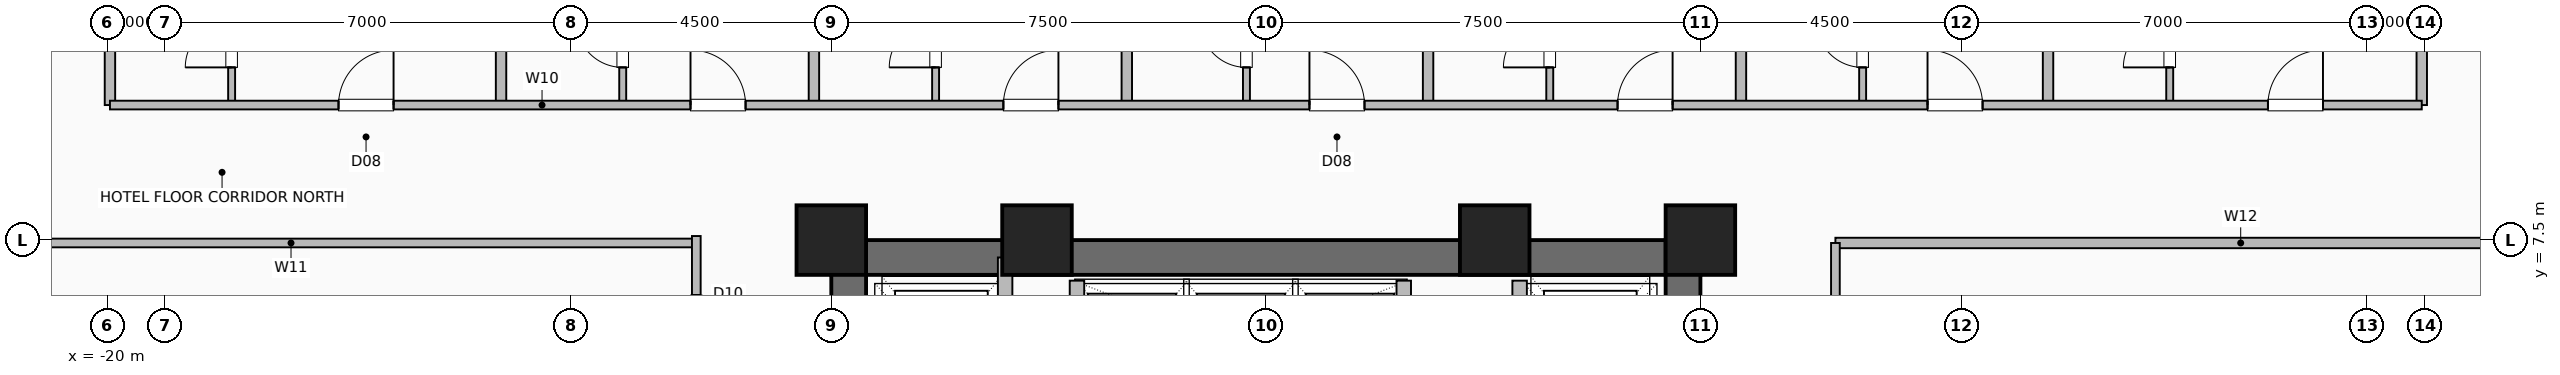
"""IFC4 building model, lengths in metres.
Left out: names, types, materials, properties, quantities, classifications, styles, units other than length and angle.
Written with IfcOpenShell. Run it as: python <this file> out.ifc"""

import sys

from ifc_helpers import new_model, si_unit, direction, frame, frame_2d, origin, origin_2d, place, context, subcontext, project, spatial, rectangle, hollow_rectangle, extrude, element, fill, save


model = new_model("IFC4")
c1 = context("Model", 3, precision=1e-05, world=origin(), true_north=direction((0.0, 1.0)))
c2 = subcontext(c1, "Body", "Model", "MODEL_VIEW")
j1 = project(units=[si_unit("LENGTHUNIT", "METRE"), si_unit("PLANEANGLEUNIT", "RADIAN")], contexts=[c1])
p1 = place(None, origin())
s1 = spatial("IfcSite", under=j1, at=p1, CompositionType="ELEMENT")
p2 = place(p1, origin())
s2 = spatial("IfcBuilding", under=s1, at=p2, CompositionType="ELEMENT")
p3 = place(p2, frame((0.0, 0.0, 72.5)))
s3 = spatial("IfcBuildingStorey", under=s2, at=p3, CompositionType="ELEMENT", Elevation=72.5)
for number, where, z_axis, x_axis in (
    (1, (7.5, 7.5, 0.0), (0.0, 0.0, 1.0), (1.0, 0.0, 0.0)),
    (2, (3.95, 7.5, 0.0), (0.0, 0.0, 1.0), (1.0, 0.0, 0.0)),
    (3, (-3.95, 7.5, 0.0), (0.0, 0.0, 1.0), (1.0, 0.0, 0.0)),
    (4, (-7.5, 7.5, 0.0), (0.0, 0.0, 1.0), (1.0, 0.0, 0.0)),
):
    element("IfcColumn", number, at=place(p3, frame(where, z_axis=z_axis, x_axis=x_axis)), inside=s3, PredefinedType="COLUMN", context=c2, shape_type="SweptSolid", body=[
        extrude(hollow_rectangle(XDim=1.2, YDim=1.2, WallThickness=0.055, at=origin_2d()), origin(), (0.0, 0.0, 1.0), 3.5),
    ])
p4 = place(p3, frame((-7.5, 7.2, 0.0), z_axis=(0.0, 0.0, 1.0), x_axis=(1.0, 0.0, 0.0)))
e5 = element("IfcWall", 5, at=p4, inside=s3, PredefinedType="SHEAR", context=c2, shape_type="SweptSolid", body=[
    extrude(rectangle(XDim=15.0, YDim=0.6, at=frame_2d((7.5, 0.0))), origin(), (0.0, 0.0, 1.0), 3.25),
])
p5 = place(p3, frame((-7.2, -7.5, 0.0), z_axis=(0.0, 0.0, 1.0), x_axis=(0.0, 1.0, 0.0)))
e6 = element("IfcWall", 6, at=p5, inside=s3, PredefinedType="SHEAR", context=c2, shape_type="SweptSolid", body=[
    extrude(rectangle(XDim=15.0, YDim=0.6, at=frame_2d((7.5, 0.0))), origin(), (0.0, 0.0, 1.0), 3.25),
])
p6 = place(p5, frame((9.5, 0.0, 0.0)))
e7 = element("IfcOpeningElement", 7, at=p6, cuts=e6, PredefinedType="OPENING", context=c2, shape_type="SweptSolid", body=[
    extrude(rectangle(XDim=1.0, YDim=2.08, at=frame_2d((0.5, 1.04))), frame((0.0, 0.31, 0.0), z_axis=(0.0, -1.0, 0.0), x_axis=(1.0, 0.0, 0.0)), (0.0, 0.0, 1.0), 0.62),
])
p7 = place(p3, frame((7.2, -7.5, 0.0), z_axis=(0.0, 0.0, 1.0), x_axis=(0.0, 1.0, 0.0)))
e8 = element("IfcWall", 8, at=p7, inside=s3, PredefinedType="SHEAR", context=c2, shape_type="SweptSolid", body=[
    extrude(rectangle(XDim=15.0, YDim=0.6, at=frame_2d((7.5, 0.0))), origin(), (0.0, 0.0, 1.0), 3.25),
])
for number, where, z_axis, x_axis in (
    (9, (-3.26, 4.58, 0.0), (0.0, 0.0, 1.0), (0.0, 1.0, 0.0)),
    (10, (2.38, 4.58, 0.0), (0.0, 0.0, 1.0), (0.0, 1.0, 0.0)),
):
    element("IfcWall", number, at=place(p3, frame(where, z_axis=z_axis, x_axis=x_axis)), inside=s3, PredefinedType="SHEAR", context=c2, shape_type="SweptSolid", body=[
        extrude(rectangle(XDim=2.22, YDim=0.25, at=frame_2d((1.11, 0.0))), origin(), (0.0, 0.0, 1.0), 3.25),
    ])
p8 = place(p3, frame((-4.5, 4.35, 0.0), z_axis=(0.0, 0.0, 1.0), x_axis=(0.0, 1.0, 0.0)))
e11 = element("IfcWall", 11, at=p8, inside=s3, PredefinedType="SHEAR", context=c2, shape_type="SweptSolid", body=[
    extrude(rectangle(XDim=2.85, YDim=0.25, at=frame_2d((1.425, 0.0))), origin(), (0.0, 0.0, 1.0), 3.25),
])
p9 = place(p3, frame((4.38, 4.3, 0.0), z_axis=(0.0, 0.0, 1.0), x_axis=(0.0, 1.0, 0.0)))
e12 = element("IfcWall", 12, at=p9, inside=s3, PredefinedType="SHEAR", context=c2, shape_type="SweptSolid", body=[
    extrude(rectangle(XDim=2.5, YDim=0.25, at=frame_2d((1.25, 0.0))), origin(), (0.0, 0.0, 1.0), 3.25),
])
p10 = place(p9, frame((0.8, 0.0, 0.0)))
e13 = element("IfcOpeningElement", 13, at=p10, cuts=e12, PredefinedType="OPENING", context=c2, shape_type="SweptSolid", body=[
    extrude(rectangle(XDim=1.2, YDim=2.2, at=frame_2d((0.6, 1.1))), frame((0.0, 0.135, 0.0), z_axis=(0.0, -1.0, 0.0), x_axis=(1.0, 0.0, 0.0)), (0.0, 0.0, 1.0), 0.27),
])
p11 = place(p3, frame((-17.85, 9.83, 0.0), z_axis=(0.0, 0.0, 1.0), x_axis=(0.0, 1.0, 0.0)))
e14 = element("IfcWall", 14, at=p11, inside=s3, PredefinedType="PLUMBINGWALL", context=c2, shape_type="SweptSolid", body=[
    extrude(rectangle(XDim=2.25, YDim=0.12, at=frame_2d((1.125, 0.0))), origin(), (0.0, 0.0, 1.0), 3.25),
])
p12 = place(p11, frame((0.65, 0.0, 0.0)))
e15 = element("IfcOpeningElement", 15, at=p12, cuts=e14, PredefinedType="OPENING", context=c2, shape_type="SweptSolid", body=[
    extrude(rectangle(XDim=0.8, YDim=2.05, at=frame_2d((0.4, 1.025))), frame((0.0, 0.07, 0.0), z_axis=(0.0, -1.0, 0.0), x_axis=(1.0, 0.0, 0.0)), (0.0, 0.0, 1.0), 0.14),
])
p13 = place(p3, frame((-11.1, 9.83, 0.0), z_axis=(0.0, 0.0, 1.0), x_axis=(0.0, 1.0, 0.0)))
e16 = element("IfcWall", 16, at=p13, inside=s3, PredefinedType="PLUMBINGWALL", context=c2, shape_type="SweptSolid", body=[
    extrude(rectangle(XDim=2.25, YDim=0.12, at=frame_2d((1.125, 0.0))), origin(), (0.0, 0.0, 1.0), 3.25),
])
p14 = place(p13, frame((0.65, 0.0, 0.0)))
e17 = element("IfcOpeningElement", 17, at=p14, cuts=e16, PredefinedType="OPENING", context=c2, shape_type="SweptSolid", body=[
    extrude(rectangle(XDim=0.8, YDim=2.05, at=frame_2d((0.4, 1.025))), frame((0.0, 0.07, 0.0), z_axis=(0.0, -1.0, 0.0), x_axis=(1.0, 0.0, 0.0)), (0.0, 0.0, 1.0), 0.14),
])
p15 = place(p3, frame((-5.7, 9.83, 0.0), z_axis=(0.0, 0.0, 1.0), x_axis=(0.0, 1.0, 0.0)))
e18 = element("IfcWall", 18, at=p15, inside=s3, PredefinedType="PLUMBINGWALL", context=c2, shape_type="SweptSolid", body=[
    extrude(rectangle(XDim=2.25, YDim=0.12, at=frame_2d((1.125, 0.0))), origin(), (0.0, 0.0, 1.0), 3.25),
])
p16 = place(p15, frame((0.65, 0.0, 0.0)))
e19 = element("IfcOpeningElement", 19, at=p16, cuts=e18, PredefinedType="OPENING", context=c2, shape_type="SweptSolid", body=[
    extrude(rectangle(XDim=0.8, YDim=2.05, at=frame_2d((0.4, 1.025))), frame((0.0, 0.07, 0.0), z_axis=(0.0, -1.0, 0.0), x_axis=(1.0, 0.0, 0.0)), (0.0, 0.0, 1.0), 0.14),
])
p17 = place(p3, frame((-0.335, 9.83, 0.0), z_axis=(0.0, 0.0, 1.0), x_axis=(0.0, 1.0, 0.0)))
e20 = element("IfcWall", 20, at=p17, inside=s3, PredefinedType="PLUMBINGWALL", context=c2, shape_type="SweptSolid", body=[
    extrude(rectangle(XDim=2.25, YDim=0.12, at=frame_2d((1.125, 0.0))), origin(), (0.0, 0.0, 1.0), 3.25),
])
p18 = place(p17, frame((0.65, 0.0, 0.0)))
e21 = element("IfcOpeningElement", 21, at=p18, cuts=e20, PredefinedType="OPENING", context=c2, shape_type="SweptSolid", body=[
    extrude(rectangle(XDim=0.8, YDim=2.05, at=frame_2d((0.4, 1.025))), frame((0.0, 0.07, 0.0), z_axis=(0.0, -1.0, 0.0), x_axis=(1.0, 0.0, 0.0)), (0.0, 0.0, 1.0), 0.14),
])
p19 = place(p3, frame((4.9, 9.83, 0.0), z_axis=(0.0, 0.0, 1.0), x_axis=(0.0, 1.0, 0.0)))
e22 = element("IfcWall", 22, at=p19, inside=s3, PredefinedType="PLUMBINGWALL", context=c2, shape_type="SweptSolid", body=[
    extrude(rectangle(XDim=2.25, YDim=0.12, at=frame_2d((1.125, 0.0))), origin(), (0.0, 0.0, 1.0), 3.25),
])
p20 = place(p19, frame((0.65, 0.0, 0.0)))
e23 = element("IfcOpeningElement", 23, at=p20, cuts=e22, PredefinedType="OPENING", context=c2, shape_type="SweptSolid", body=[
    extrude(rectangle(XDim=0.8, YDim=2.05, at=frame_2d((0.4, 1.025))), frame((0.0, 0.07, 0.0), z_axis=(0.0, -1.0, 0.0), x_axis=(1.0, 0.0, 0.0)), (0.0, 0.0, 1.0), 0.14),
])
p21 = place(p3, frame((10.3, 9.83, 0.0), z_axis=(0.0, 0.0, 1.0), x_axis=(0.0, 1.0, 0.0)))
e24 = element("IfcWall", 24, at=p21, inside=s3, PredefinedType="PLUMBINGWALL", context=c2, shape_type="SweptSolid", body=[
    extrude(rectangle(XDim=2.25, YDim=0.12, at=frame_2d((1.125, 0.0))), origin(), (0.0, 0.0, 1.0), 3.25),
])
p22 = place(p21, frame((0.65, 0.0, 0.0)))
e25 = element("IfcOpeningElement", 25, at=p22, cuts=e24, PredefinedType="OPENING", context=c2, shape_type="SweptSolid", body=[
    extrude(rectangle(XDim=0.8, YDim=2.05, at=frame_2d((0.4, 1.025))), frame((0.0, 0.07, 0.0), z_axis=(0.0, -1.0, 0.0), x_axis=(1.0, 0.0, 0.0)), (0.0, 0.0, 1.0), 0.14),
])
p23 = place(p3, frame((15.6, 9.83, 0.0), z_axis=(0.0, 0.0, 1.0), x_axis=(0.0, 1.0, 0.0)))
e26 = element("IfcWall", 26, at=p23, inside=s3, PredefinedType="PLUMBINGWALL", context=c2, shape_type="SweptSolid", body=[
    extrude(rectangle(XDim=2.25, YDim=0.12, at=frame_2d((1.125, 0.0))), origin(), (0.0, 0.0, 1.0), 3.25),
])
p24 = place(p23, frame((0.65, 0.0, 0.0)))
e27 = element("IfcOpeningElement", 27, at=p24, cuts=e26, PredefinedType="OPENING", context=c2, shape_type="SweptSolid", body=[
    extrude(rectangle(XDim=0.8, YDim=2.05, at=frame_2d((0.4, 1.025))), frame((0.0, 0.07, 0.0), z_axis=(0.0, -1.0, 0.0), x_axis=(1.0, 0.0, 0.0)), (0.0, 0.0, 1.0), 0.14),
])
for number, where, z_axis, x_axis in (
    (28, (-19.95, 9.83, 0.0), (0.0, 0.0, 1.0), (0.0, 1.0, 0.0)),
    (29, (-13.2, 9.83, 0.0), (0.0, 0.0, 1.0), (0.0, 1.0, 0.0)),
    (30, (-7.8, 9.83, 0.0), (0.0, 0.0, 1.0), (0.0, 1.0, 0.0)),
    (31, (-2.4, 9.83, 0.0), (0.0, 0.0, 1.0), (0.0, 1.0, 0.0)),
    (32, (2.8, 9.83, 0.0), (0.0, 0.0, 1.0), (0.0, 1.0, 0.0)),
    (33, (8.2, 9.83, 0.0), (0.0, 0.0, 1.0), (0.0, 1.0, 0.0)),
    (34, (13.5, 9.83, 0.0), (0.0, 0.0, 1.0), (0.0, 1.0, 0.0)),
    (35, (19.95, 9.83, 0.0), (0.0, 0.0, 1.0), (0.0, 1.0, 0.0)),
):
    element("IfcWall", number, at=place(p3, frame(where, z_axis=z_axis, x_axis=x_axis)), inside=s3, PredefinedType="PARTITIONING", context=c2, shape_type="SweptSolid", body=[
        extrude(rectangle(XDim=13.99, YDim=0.18, at=frame_2d((6.995, 0.0))), origin(), (0.0, 0.0, 1.0), 3.25),
    ])
p25 = place(p3, frame((-19.95, 9.83, 0.0), z_axis=(0.0, 0.0, 1.0), x_axis=(1.0, 0.0, 0.0)))
e36 = element("IfcWall", 36, at=p25, inside=s3, PredefinedType="PARTITIONING", context=c2, shape_type="SweptSolid", body=[
    extrude(rectangle(XDim=39.9, YDim=0.15, at=frame_2d((19.95, 0.0))), origin(), (0.0, 0.0, 1.0), 3.25),
])
p26 = place(p25, frame((3.945, 0.0, 0.0)))
e37 = element("IfcOpeningElement", 37, at=p26, cuts=e36, PredefinedType="OPENING", context=c2, shape_type="SweptSolid", body=[
    extrude(rectangle(XDim=0.95, YDim=2.08, at=frame_2d((0.475, 1.04))), frame((0.0, 0.085, 0.0), z_axis=(0.0, -1.0, 0.0), x_axis=(1.0, 0.0, 0.0)), (0.0, 0.0, 1.0), 0.17),
])
p27 = place(p25, frame((10.02, 0.0, 0.0)))
e38 = element("IfcOpeningElement", 38, at=p27, cuts=e36, PredefinedType="OPENING", context=c2, shape_type="SweptSolid", body=[
    extrude(rectangle(XDim=0.95, YDim=2.08, at=frame_2d((0.475, 1.04))), frame((0.0, 0.085, 0.0), z_axis=(0.0, -1.0, 0.0), x_axis=(1.0, 0.0, 0.0)), (0.0, 0.0, 1.0), 0.17),
])
p28 = place(p25, frame((15.42, 0.0, 0.0)))
e39 = element("IfcOpeningElement", 39, at=p28, cuts=e36, PredefinedType="OPENING", context=c2, shape_type="SweptSolid", body=[
    extrude(rectangle(XDim=0.95, YDim=2.08, at=frame_2d((0.475, 1.04))), frame((0.0, 0.085, 0.0), z_axis=(0.0, -1.0, 0.0), x_axis=(1.0, 0.0, 0.0)), (0.0, 0.0, 1.0), 0.17),
])
p29 = place(p25, frame((20.702, 0.0, 0.0)))
e40 = element("IfcOpeningElement", 40, at=p29, cuts=e36, PredefinedType="OPENING", context=c2, shape_type="SweptSolid", body=[
    extrude(rectangle(XDim=0.95, YDim=2.08, at=frame_2d((0.475, 1.04))), frame((0.0, 0.085, 0.0), z_axis=(0.0, -1.0, 0.0), x_axis=(1.0, 0.0, 0.0)), (0.0, 0.0, 1.0), 0.17),
])
p30 = place(p25, frame((26.02, 0.0, 0.0)))
e41 = element("IfcOpeningElement", 41, at=p30, cuts=e36, PredefinedType="OPENING", context=c2, shape_type="SweptSolid", body=[
    extrude(rectangle(XDim=0.95, YDim=2.08, at=frame_2d((0.475, 1.04))), frame((0.0, 0.085, 0.0), z_axis=(0.0, -1.0, 0.0), x_axis=(1.0, 0.0, 0.0)), (0.0, 0.0, 1.0), 0.17),
])
p31 = place(p25, frame((31.37, 0.0, 0.0)))
e42 = element("IfcOpeningElement", 42, at=p31, cuts=e36, PredefinedType="OPENING", context=c2, shape_type="SweptSolid", body=[
    extrude(rectangle(XDim=0.95, YDim=2.08, at=frame_2d((0.475, 1.04))), frame((0.0, 0.085, 0.0), z_axis=(0.0, -1.0, 0.0), x_axis=(1.0, 0.0, 0.0)), (0.0, 0.0, 1.0), 0.17),
])
p32 = place(p25, frame((37.245, 0.0, 0.0)))
e43 = element("IfcOpeningElement", 43, at=p32, cuts=e36, PredefinedType="OPENING", context=c2, shape_type="SweptSolid", body=[
    extrude(rectangle(XDim=0.95, YDim=2.08, at=frame_2d((0.475, 1.04))), frame((0.0, 0.085, 0.0), z_axis=(0.0, -1.0, 0.0), x_axis=(1.0, 0.0, 0.0)), (0.0, 0.0, 1.0), 0.17),
])
p33 = place(p3, frame((-23.82, 7.45, 0.0), z_axis=(0.0, 0.0, 1.0), x_axis=(1.0, 0.0, 0.0)))
e44 = element("IfcWall", 44, at=p33, inside=s3, PredefinedType="PARTITIONING", context=c2, shape_type="SweptSolid", body=[
    extrude(rectangle(XDim=13.99, YDim=0.15, at=frame_2d((6.995, 0.0))), origin(), (0.0, 0.0, 1.0), 3.25),
])
p34 = place(p3, frame((-9.83, -7.57, 0.0), z_axis=(0.0, 0.0, 1.0), x_axis=(0.0, 1.0, 0.0)))
e45 = element("IfcWall", 45, at=p34, inside=s3, PredefinedType="PARTITIONING", context=c2, shape_type="SweptSolid", body=[
    extrude(rectangle(XDim=15.14, YDim=0.15, at=frame_2d((7.57, 0.0))), origin(), (0.0, 0.0, 1.0), 3.25),
])
p35 = place(p34, frame((2.47, 0.0, 0.0)))
e46 = element("IfcOpeningElement", 46, at=p35, cuts=e45, PredefinedType="OPENING", context=c2, shape_type="SweptSolid", body=[
    extrude(rectangle(XDim=0.95, YDim=2.06, at=frame_2d((0.475, 1.03))), frame((0.0, 0.085, 0.0), z_axis=(0.0, -1.0, 0.0), x_axis=(1.0, 0.0, 0.0)), (0.0, 0.0, 1.0), 0.17),
])
p36 = place(p34, frame((8.595, 0.0, 0.0)))
e47 = element("IfcOpeningElement", 47, at=p36, cuts=e45, PredefinedType="OPENING", context=c2, shape_type="SweptSolid", body=[
    extrude(rectangle(XDim=0.95, YDim=2.06, at=frame_2d((0.475, 1.03))), frame((0.0, 0.085, 0.0), z_axis=(0.0, -1.0, 0.0), x_axis=(1.0, 0.0, 0.0)), (0.0, 0.0, 1.0), 0.17),
])
p37 = place(p34, frame((13.27, 0.0, 0.0)))
e48 = element("IfcOpeningElement", 48, at=p37, cuts=e45, PredefinedType="OPENING", context=c2, shape_type="SweptSolid", body=[
    extrude(rectangle(XDim=0.85, YDim=2.05, at=frame_2d((0.425, 1.025))), frame((0.0, 0.085, 0.0), z_axis=(0.0, -1.0, 0.0), x_axis=(1.0, 0.0, 0.0)), (0.0, 0.0, 1.0), 0.17),
])
p38 = place(p3, frame((9.83, 7.45, 0.0), z_axis=(0.0, 0.0, 1.0), x_axis=(1.0, 0.0, 0.0)))
e49 = element("IfcWall", 49, at=p38, inside=s3, PredefinedType="PARTITIONING", context=c2, shape_type="SweptSolid", body=[
    extrude(rectangle(XDim=13.99, YDim=0.18, at=frame_2d((6.995, 0.0))), origin(), (0.0, 0.0, 1.0), 3.25),
])
p39 = place(p3, frame((9.83, -7.45, 0.0), z_axis=(0.0, 0.0, 1.0), x_axis=(0.0, 1.0, 0.0)))
e50 = element("IfcWall", 50, at=p39, inside=s3, PredefinedType="PARTITIONING", context=c2, shape_type="SweptSolid", body=[
    extrude(rectangle(XDim=14.9, YDim=0.15, at=frame_2d((7.45, 0.0))), origin(), (0.0, 0.0, 1.0), 3.25),
])
p40 = place(p39, frame((3.049, 0.0, 0.0)))
e51 = element("IfcOpeningElement", 51, at=p40, cuts=e50, PredefinedType="OPENING", context=c2, shape_type="SweptSolid", body=[
    extrude(rectangle(XDim=0.95, YDim=2.08, at=frame_2d((0.475, 1.04))), frame((0.0, 0.085, 0.0), z_axis=(0.0, -1.0, 0.0), x_axis=(1.0, 0.0, 0.0)), (0.0, 0.0, 1.0), 0.17),
])
p41 = place(p39, frame((7.927, 0.0, 0.0)))
e52 = element("IfcOpeningElement", 52, at=p41, cuts=e50, PredefinedType="OPENING", context=c2, shape_type="SweptSolid", body=[
    extrude(rectangle(XDim=0.95, YDim=2.08, at=frame_2d((0.475, 1.04))), frame((0.0, 0.085, 0.0), z_axis=(0.0, -1.0, 0.0), x_axis=(1.0, 0.0, 0.0)), (0.0, 0.0, 1.0), 0.17),
])
p42 = place(p39, frame((12.899, 0.0, 0.0)))
e53 = element("IfcOpeningElement", 53, at=p42, cuts=e50, PredefinedType="OPENING", context=c2, shape_type="SweptSolid", body=[
    extrude(rectangle(XDim=0.95, YDim=2.08, at=frame_2d((0.475, 1.04))), frame((0.0, 0.085, 0.0), z_axis=(0.0, -1.0, 0.0), x_axis=(1.0, 0.0, 0.0)), (0.0, 0.0, 1.0), 0.17),
])
p43 = place(p12, origin())
e54 = element("IfcDoor", 54, at=p43, inside=s3, OperationType="SINGLE_SWING_LEFT", PredefinedType="DOOR", context=c2, shape_type="SweptSolid", body=[
    extrude(rectangle(XDim=0.8, YDim=2.05, at=frame_2d((0.4, 1.025))), frame((0.0, 0.025, 0.0), z_axis=(0.0, -1.0, 0.0), x_axis=(1.0, 0.0, 0.0)), (0.0, 0.0, 1.0), 0.05),
])
fill(e15, e54)
p44 = place(p14, origin())
e55 = element("IfcDoor", 55, at=p44, inside=s3, OperationType="SINGLE_SWING_RIGHT", PredefinedType="DOOR", context=c2, shape_type="SweptSolid", body=[
    extrude(rectangle(XDim=0.8, YDim=2.05, at=frame_2d((0.4, 1.025))), frame((0.0, 0.025, 0.0), z_axis=(0.0, -1.0, 0.0), x_axis=(1.0, 0.0, 0.0)), (0.0, 0.0, 1.0), 0.05),
])
fill(e17, e55)
p45 = place(p16, origin())
e56 = element("IfcDoor", 56, at=p45, inside=s3, OperationType="SINGLE_SWING_LEFT", PredefinedType="DOOR", context=c2, shape_type="SweptSolid", body=[
    extrude(rectangle(XDim=0.8, YDim=2.05, at=frame_2d((0.4, 1.025))), frame((0.0, 0.025, 0.0), z_axis=(0.0, -1.0, 0.0), x_axis=(1.0, 0.0, 0.0)), (0.0, 0.0, 1.0), 0.05),
])
fill(e19, e56)
p46 = place(p18, origin())
e57 = element("IfcDoor", 57, at=p46, inside=s3, OperationType="SINGLE_SWING_RIGHT", PredefinedType="DOOR", context=c2, shape_type="SweptSolid", body=[
    extrude(rectangle(XDim=0.8, YDim=2.05, at=frame_2d((0.4, 1.025))), frame((0.0, 0.025, 0.0), z_axis=(0.0, -1.0, 0.0), x_axis=(1.0, 0.0, 0.0)), (0.0, 0.0, 1.0), 0.05),
])
fill(e21, e57)
p47 = place(p20, origin())
e58 = element("IfcDoor", 58, at=p47, inside=s3, OperationType="SINGLE_SWING_LEFT", PredefinedType="DOOR", context=c2, shape_type="SweptSolid", body=[
    extrude(rectangle(XDim=0.8, YDim=2.05, at=frame_2d((0.4, 1.025))), frame((0.0, 0.025, 0.0), z_axis=(0.0, -1.0, 0.0), x_axis=(1.0, 0.0, 0.0)), (0.0, 0.0, 1.0), 0.05),
])
fill(e23, e58)
p48 = place(p22, origin())
e59 = element("IfcDoor", 59, at=p48, inside=s3, OperationType="SINGLE_SWING_RIGHT", PredefinedType="DOOR", context=c2, shape_type="SweptSolid", body=[
    extrude(rectangle(XDim=0.8, YDim=2.05, at=frame_2d((0.4, 1.025))), frame((0.0, 0.025, 0.0), z_axis=(0.0, -1.0, 0.0), x_axis=(1.0, 0.0, 0.0)), (0.0, 0.0, 1.0), 0.05),
])
fill(e25, e59)
p49 = place(p24, origin())
e60 = element("IfcDoor", 60, at=p49, inside=s3, OperationType="SINGLE_SWING_LEFT", PredefinedType="DOOR", context=c2, shape_type="SweptSolid", body=[
    extrude(rectangle(XDim=0.8, YDim=2.05, at=frame_2d((0.4, 1.025))), frame((0.0, 0.025, 0.0), z_axis=(0.0, -1.0, 0.0), x_axis=(1.0, 0.0, 0.0)), (0.0, 0.0, 1.0), 0.05),
])
fill(e27, e60)
p50 = place(p26, origin())
e61 = element("IfcDoor", 61, at=p50, inside=s3, OperationType="SINGLE_SWING_RIGHT", PredefinedType="DOOR", context=c2, shape_type="SweptSolid", body=[
    extrude(rectangle(XDim=0.95, YDim=2.08, at=frame_2d((0.475, 1.04))), frame((0.0, 0.025, 0.0), z_axis=(0.0, -1.0, 0.0), x_axis=(1.0, 0.0, 0.0)), (0.0, 0.0, 1.0), 0.05),
])
fill(e37, e61)
p51 = place(p27, origin())
e62 = element("IfcDoor", 62, at=p51, inside=s3, OperationType="SINGLE_SWING_LEFT", PredefinedType="DOOR", context=c2, shape_type="SweptSolid", body=[
    extrude(rectangle(XDim=0.95, YDim=2.08, at=frame_2d((0.475, 1.04))), frame((0.0, 0.025, 0.0), z_axis=(0.0, -1.0, 0.0), x_axis=(1.0, 0.0, 0.0)), (0.0, 0.0, 1.0), 0.05),
])
fill(e38, e62)
p52 = place(p28, origin())
e63 = element("IfcDoor", 63, at=p52, inside=s3, OperationType="SINGLE_SWING_RIGHT", PredefinedType="DOOR", context=c2, shape_type="SweptSolid", body=[
    extrude(rectangle(XDim=0.95, YDim=2.08, at=frame_2d((0.475, 1.04))), frame((0.0, 0.025, 0.0), z_axis=(0.0, -1.0, 0.0), x_axis=(1.0, 0.0, 0.0)), (0.0, 0.0, 1.0), 0.05),
])
fill(e39, e63)
p53 = place(p29, origin())
e64 = element("IfcDoor", 64, at=p53, inside=s3, OperationType="SINGLE_SWING_LEFT", PredefinedType="DOOR", context=c2, shape_type="SweptSolid", body=[
    extrude(rectangle(XDim=0.95, YDim=2.08, at=frame_2d((0.475, 1.04))), frame((0.0, 0.025, 0.0), z_axis=(0.0, -1.0, 0.0), x_axis=(1.0, 0.0, 0.0)), (0.0, 0.0, 1.0), 0.05),
])
fill(e40, e64)
p54 = place(p30, origin())
e65 = element("IfcDoor", 65, at=p54, inside=s3, OperationType="SINGLE_SWING_RIGHT", PredefinedType="DOOR", context=c2, shape_type="SweptSolid", body=[
    extrude(rectangle(XDim=0.95, YDim=2.08, at=frame_2d((0.475, 1.04))), frame((0.0, 0.025, 0.0), z_axis=(0.0, -1.0, 0.0), x_axis=(1.0, 0.0, 0.0)), (0.0, 0.0, 1.0), 0.05),
])
fill(e41, e65)
p55 = place(p31, origin())
e66 = element("IfcDoor", 66, at=p55, inside=s3, OperationType="SINGLE_SWING_LEFT", PredefinedType="DOOR", context=c2, shape_type="SweptSolid", body=[
    extrude(rectangle(XDim=0.95, YDim=2.08, at=frame_2d((0.475, 1.04))), frame((0.0, 0.025, 0.0), z_axis=(0.0, -1.0, 0.0), x_axis=(1.0, 0.0, 0.0)), (0.0, 0.0, 1.0), 0.05),
])
fill(e42, e66)
p56 = place(p32, origin())
e67 = element("IfcDoor", 67, at=p56, inside=s3, OperationType="SINGLE_SWING_RIGHT", PredefinedType="DOOR", context=c2, shape_type="SweptSolid", body=[
    extrude(rectangle(XDim=0.95, YDim=2.08, at=frame_2d((0.475, 1.04))), frame((0.0, 0.025, 0.0), z_axis=(0.0, -1.0, 0.0), x_axis=(1.0, 0.0, 0.0)), (0.0, 0.0, 1.0), 0.05),
])
fill(e43, e67)
save(model, sys.argv[1])
